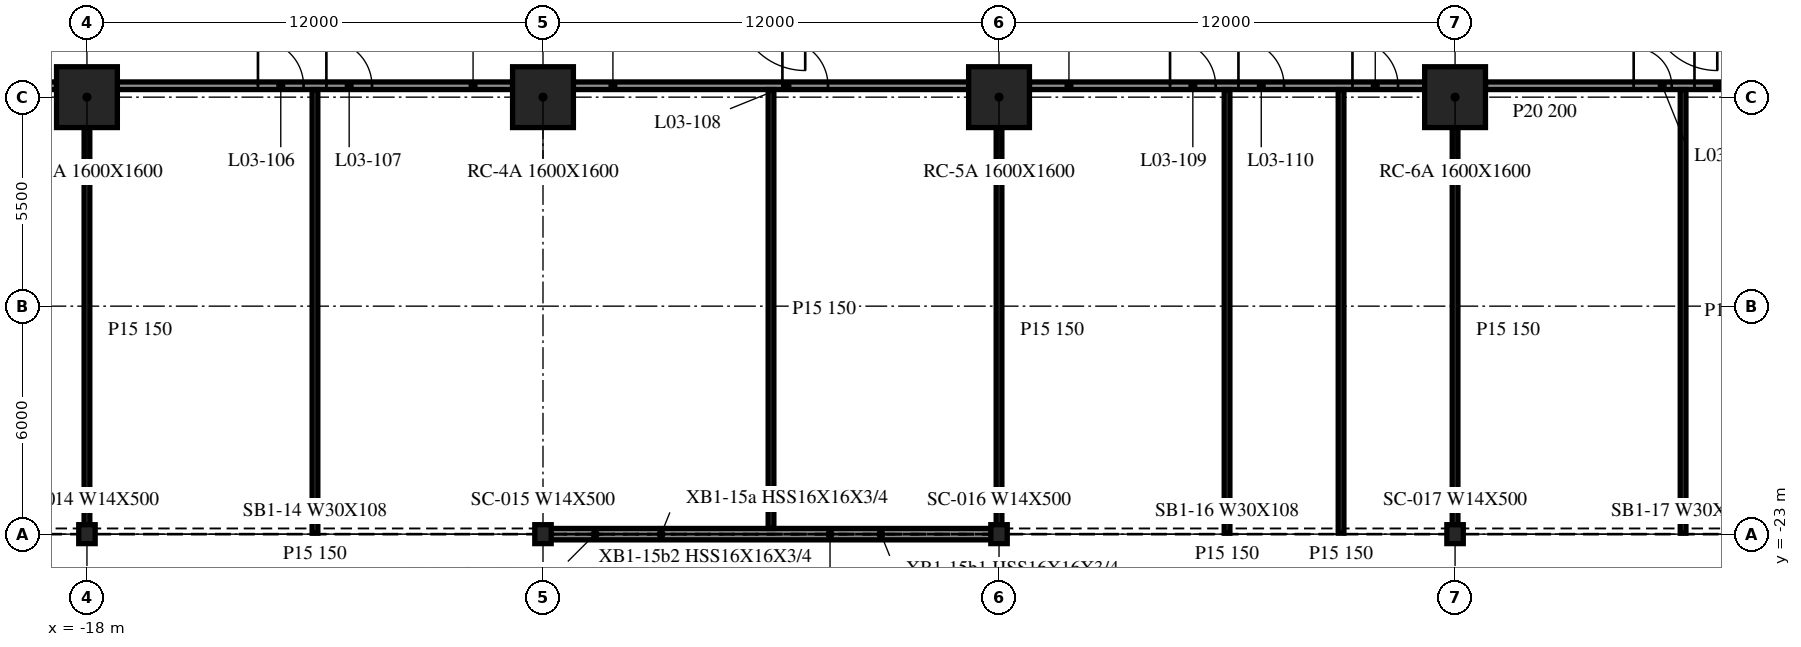
"""IFC4 building model, lengths in metres.
Left out: names, types, materials, properties, quantities, classifications, styles, units other than length and angle.
Written with IfcOpenShell. Run it as: python <this file> out.ifc"""

import sys

from ifc_helpers import new_model, si_unit, direction, frame, frame_2d, origin, origin_2d, place, context, subcontext, project, spatial, rectangle, i_section, extrude, element, fill, save


model = new_model("IFC4")
c1 = context("Model", 3, precision=1e-05, world=origin(), true_north=direction((0.0, 1.0)))
c2 = subcontext(c1, "Body", "Model", "MODEL_VIEW")
j1 = project(units=[si_unit("LENGTHUNIT", "METRE"), si_unit("PLANEANGLEUNIT", "RADIAN")], contexts=[c1])
p1 = place(None, origin())
s1 = spatial("IfcSite", under=j1, at=p1, CompositionType="ELEMENT")
p2 = place(p1, origin())
s2 = spatial("IfcBuilding", under=s1, at=p2, CompositionType="ELEMENT")
p3 = place(p2, frame((0.0, 0.0, 15.8)))
s3 = spatial("IfcBuildingStorey", under=s2, at=p3, CompositionType="ELEMENT", Elevation=15.8)
for number, where, z_axis, x_axis in (
    (1, (-18.0, -11.5, -0.34), (0.0, 0.0, 1.0), (1.0, 0.0, 0.0)),
    (2, (-6.0, -11.5, -0.34), (0.0, 0.0, 1.0), (1.0, 0.0, 0.0)),
    (3, (6.0, -11.5, -0.34), (0.0, 0.0, 1.0), (1.0, 0.0, 0.0)),
    (4, (18.0, -11.5, -0.34), (0.0, 0.0, 1.0), (1.0, 0.0, 0.0)),
):
    element("IfcColumn", number, at=place(p3, frame(where, z_axis=z_axis, x_axis=x_axis)), inside=s3, PredefinedType="COLUMN", context=c2, shape_type="SweptSolid", body=[
        extrude(rectangle(XDim=1.6, YDim=1.6, at=origin_2d()), origin(), (0.0, 0.0, 1.0), 4.3),
    ])
for number, where, z_axis, x_axis in (
    (5, (-18.0, -23.0, -0.34), (0.0, 0.0, 1.0), (1.0, 0.0, 0.0)),
    (6, (-6.0, -23.0, -0.34), (0.0, 0.0, 1.0), (1.0, 0.0, 0.0)),
    (7, (6.0, -23.0, -0.34), (0.0, 0.0, 1.0), (1.0, 0.0, 0.0)),
    (8, (18.0, -23.0, -0.34), (0.0, 0.0, 1.0), (1.0, 0.0, 0.0)),
):
    element("IfcColumn", number, at=place(p3, frame(where, z_axis=z_axis, x_axis=x_axis)), inside=s3, PredefinedType="COLUMN", context=c2, shape_type="SweptSolid", body=[
        extrude(i_section(OverallWidth=0.432, OverallDepth=0.498, WebThickness=0.056, FlangeThickness=0.089, at=origin_2d()), origin(), (0.0, 0.0, 1.0), 4.3),
    ])
p4 = place(p3, frame((-5.972, -23.0, 0.0), z_axis=(0.0, 0.0, 1.0), x_axis=(1.0, 0.0, 0.0)))
e9 = element("IfcWall", 9, at=p4, inside=s3, PredefinedType="NOTDEFINED", context=c2, shape_type="SweptSolid", body=[
    extrude(rectangle(XDim=11.944, YDim=0.3, at=frame_2d((5.972, 0.0))), origin(), (0.0, 0.0, 1.0), 3.203),
])
p5 = place(p3, frame((-29.2, -11.2, 0.0), z_axis=(0.0, 0.0, 1.0), x_axis=(1.0, 0.0, 0.0)))
e10 = element("IfcWall", 10, at=p5, inside=s3, PredefinedType="PARTITIONING", context=c2, shape_type="SweptSolid", body=[
    extrude(rectangle(XDim=10.4, YDim=0.2, at=frame_2d((5.2, 0.0))), origin(), (0.0, 0.0, 1.0), 3.96),
])
p6 = place(p5, frame((3.7, 0.0, 0.0)))
e11 = element("IfcOpeningElement", 11, at=p6, cuts=e10, PredefinedType="OPENING", context=c2, shape_type="SweptSolid", body=[
    extrude(rectangle(XDim=1.2, YDim=2.1, at=frame_2d((0.6, 1.05))), frame((0.0, 0.11, 0.0), z_axis=(0.0, -1.0, 0.0), x_axis=(1.0, 0.0, 0.0)), (0.0, 0.0, 1.0), 0.22),
])
p7 = place(p5, frame((5.5, 0.0, 0.0)))
e12 = element("IfcOpeningElement", 12, at=p7, cuts=e10, PredefinedType="OPENING", context=c2, shape_type="SweptSolid", body=[
    extrude(rectangle(XDim=1.2, YDim=2.1, at=frame_2d((0.6, 1.05))), frame((0.0, 0.11, 0.0), z_axis=(0.0, -1.0, 0.0), x_axis=(1.0, 0.0, 0.0)), (0.0, 0.0, 1.0), 0.22),
])
p8 = place(p5, frame((8.5, 0.0, 0.0)))
e13 = element("IfcOpeningElement", 13, at=p8, cuts=e10, PredefinedType="OPENING", context=c2, shape_type="SweptSolid", body=[
    extrude(rectangle(XDim=1.0, YDim=2.1, at=frame_2d((0.5, 1.05))), frame((0.0, 0.11, 0.0), z_axis=(0.0, -1.0, 0.0), x_axis=(1.0, 0.0, 0.0)), (0.0, 0.0, 1.0), 0.22),
])
p9 = place(p3, frame((-17.2, -11.2, 0.0), z_axis=(0.0, 0.0, 1.0), x_axis=(1.0, 0.0, 0.0)))
e14 = element("IfcWall", 14, at=p9, inside=s3, PredefinedType="PARTITIONING", context=c2, shape_type="SweptSolid", body=[
    extrude(rectangle(XDim=10.4, YDim=0.2, at=frame_2d((5.2, 0.0))), origin(), (0.0, 0.0, 1.0), 3.96),
])
p10 = place(p9, frame((3.7, 0.0, 0.0)))
e15 = element("IfcOpeningElement", 15, at=p10, cuts=e14, PredefinedType="OPENING", context=c2, shape_type="SweptSolid", body=[
    extrude(rectangle(XDim=1.2, YDim=2.1, at=frame_2d((0.6, 1.05))), frame((0.0, 0.11, 0.0), z_axis=(0.0, -1.0, 0.0), x_axis=(1.0, 0.0, 0.0)), (0.0, 0.0, 1.0), 0.22),
])
p11 = place(p9, frame((5.5, 0.0, 0.0)))
e16 = element("IfcOpeningElement", 16, at=p11, cuts=e14, PredefinedType="OPENING", context=c2, shape_type="SweptSolid", body=[
    extrude(rectangle(XDim=1.2, YDim=2.1, at=frame_2d((0.6, 1.05))), frame((0.0, 0.11, 0.0), z_axis=(0.0, -1.0, 0.0), x_axis=(1.0, 0.0, 0.0)), (0.0, 0.0, 1.0), 0.22),
])
p12 = place(p3, frame((-5.2, -11.2, 0.0), z_axis=(0.0, 0.0, 1.0), x_axis=(1.0, 0.0, 0.0)))
e17 = element("IfcWall", 17, at=p12, inside=s3, PredefinedType="PARTITIONING", context=c2, shape_type="SweptSolid", body=[
    extrude(rectangle(XDim=10.4, YDim=0.2, at=frame_2d((5.2, 0.0))), origin(), (0.0, 0.0, 1.0), 3.96),
])
p13 = place(p12, frame((5.5, 0.0, 0.0)))
e18 = element("IfcOpeningElement", 18, at=p13, cuts=e17, PredefinedType="OPENING", context=c2, shape_type="SweptSolid", body=[
    extrude(rectangle(XDim=1.2, YDim=2.1, at=frame_2d((0.6, 1.05))), frame((0.0, 0.11, 0.0), z_axis=(0.0, -1.0, 0.0), x_axis=(1.0, 0.0, 0.0)), (0.0, 0.0, 1.0), 0.22),
])
p14 = place(p3, frame((6.8, -11.2, 0.0), z_axis=(0.0, 0.0, 1.0), x_axis=(1.0, 0.0, 0.0)))
e19 = element("IfcWall", 19, at=p14, inside=s3, PredefinedType="PARTITIONING", context=c2, shape_type="SweptSolid", body=[
    extrude(rectangle(XDim=10.4, YDim=0.2, at=frame_2d((5.2, 0.0))), origin(), (0.0, 0.0, 1.0), 3.96),
])
p15 = place(p14, frame((3.7, 0.0, 0.0)))
e20 = element("IfcOpeningElement", 20, at=p15, cuts=e19, PredefinedType="OPENING", context=c2, shape_type="SweptSolid", body=[
    extrude(rectangle(XDim=1.2, YDim=2.1, at=frame_2d((0.6, 1.05))), frame((0.0, 0.11, 0.0), z_axis=(0.0, -1.0, 0.0), x_axis=(1.0, 0.0, 0.0)), (0.0, 0.0, 1.0), 0.22),
])
p16 = place(p14, frame((5.5, 0.0, 0.0)))
e21 = element("IfcOpeningElement", 21, at=p16, cuts=e19, PredefinedType="OPENING", context=c2, shape_type="SweptSolid", body=[
    extrude(rectangle(XDim=1.2, YDim=2.1, at=frame_2d((0.6, 1.05))), frame((0.0, 0.11, 0.0), z_axis=(0.0, -1.0, 0.0), x_axis=(1.0, 0.0, 0.0)), (0.0, 0.0, 1.0), 0.22),
])
p17 = place(p14, frame((8.5, 0.0, 0.0)))
e22 = element("IfcOpeningElement", 22, at=p17, cuts=e19, PredefinedType="OPENING", context=c2, shape_type="SweptSolid", body=[
    extrude(rectangle(XDim=1.2, YDim=2.1, at=frame_2d((0.6, 1.05))), frame((0.0, 0.11, 0.0), z_axis=(0.0, -1.0, 0.0), x_axis=(1.0, 0.0, 0.0)), (0.0, 0.0, 1.0), 0.22),
])
p18 = place(p3, frame((18.8, -11.2, 0.0), z_axis=(0.0, 0.0, 1.0), x_axis=(1.0, 0.0, 0.0)))
e23 = element("IfcWall", 23, at=p18, inside=s3, PredefinedType="PARTITIONING", context=c2, shape_type="SweptSolid", body=[
    extrude(rectangle(XDim=10.4, YDim=0.2, at=frame_2d((5.2, 0.0))), origin(), (0.0, 0.0, 1.0), 3.96),
])
p19 = place(p18, frame((3.9, 0.0, 0.0)))
e24 = element("IfcOpeningElement", 24, at=p19, cuts=e23, PredefinedType="OPENING", context=c2, shape_type="SweptSolid", body=[
    extrude(rectangle(XDim=1.0, YDim=2.1, at=frame_2d((0.5, 1.05))), frame((0.0, 0.11, 0.0), z_axis=(0.0, -1.0, 0.0), x_axis=(1.0, 0.0, 0.0)), (0.0, 0.0, 1.0), 0.22),
])
p20 = place(p18, frame((5.5, 0.0, 0.0)))
e25 = element("IfcOpeningElement", 25, at=p20, cuts=e23, PredefinedType="OPENING", context=c2, shape_type="SweptSolid", body=[
    extrude(rectangle(XDim=1.2, YDim=2.1, at=frame_2d((0.6, 1.05))), frame((0.0, 0.11, 0.0), z_axis=(0.0, -1.0, 0.0), x_axis=(1.0, 0.0, 0.0)), (0.0, 0.0, 1.0), 0.22),
])
p21 = place(p3, frame((-18.0, -22.975, 0.0), z_axis=(0.0, 0.0, 1.0), x_axis=(0.0, 1.0, 0.0)))
e26 = element("IfcWall", 26, at=p21, inside=s3, PredefinedType="PARTITIONING", context=c2, shape_type="SweptSolid", body=[
    extrude(rectangle(XDim=10.675, YDim=0.15, at=frame_2d((5.337, 0.0))), origin(), (0.0, 0.0, 1.0), 3.96),
])
p22 = place(p3, frame((-12.0, -22.975, 0.0), z_axis=(0.0, 0.0, 1.0), x_axis=(0.0, 1.0, 0.0)))
e27 = element("IfcWall", 27, at=p22, inside=s3, PredefinedType="PARTITIONING", context=c2, shape_type="SweptSolid", body=[
    extrude(rectangle(XDim=11.675, YDim=0.15, at=frame_2d((5.837, 0.0))), origin(), (0.0, 0.0, 1.0), 3.96),
])
p23 = place(p3, frame((0.0, -22.85, 0.0), z_axis=(0.0, 0.0, 1.0), x_axis=(0.0, 1.0, 0.0)))
e28 = element("IfcWall", 28, at=p23, inside=s3, PredefinedType="PARTITIONING", context=c2, shape_type="SweptSolid", body=[
    extrude(rectangle(XDim=11.55, YDim=0.15, at=frame_2d((5.775, 0.0))), origin(), (0.0, 0.0, 1.0), 3.96),
])
p24 = place(p3, frame((6.0, -22.975, 0.0), z_axis=(0.0, 0.0, 1.0), x_axis=(0.0, 1.0, 0.0)))
e29 = element("IfcWall", 29, at=p24, inside=s3, PredefinedType="PARTITIONING", context=c2, shape_type="SweptSolid", body=[
    extrude(rectangle(XDim=10.675, YDim=0.15, at=frame_2d((5.337, 0.0))), origin(), (0.0, 0.0, 1.0), 3.96),
])
for number, where, z_axis, x_axis in (
    (30, (12.0, -22.975, 0.0), (0.0, 0.0, 1.0), (0.0, 1.0, 0.0)),
    (31, (15.0, -22.975, 0.0), (0.0, 0.0, 1.0), (0.0, 1.0, 0.0)),
):
    element("IfcWall", number, at=place(p3, frame(where, z_axis=z_axis, x_axis=x_axis)), inside=s3, PredefinedType="PARTITIONING", context=c2, shape_type="SweptSolid", body=[
        extrude(rectangle(XDim=11.675, YDim=0.15, at=frame_2d((5.837, 0.0))), origin(), (0.0, 0.0, 1.0), 3.96),
    ])
p25 = place(p3, frame((18.0, -22.975, 0.0), z_axis=(0.0, 0.0, 1.0), x_axis=(0.0, 1.0, 0.0)))
e32 = element("IfcWall", 32, at=p25, inside=s3, PredefinedType="PARTITIONING", context=c2, shape_type="SweptSolid", body=[
    extrude(rectangle(XDim=10.675, YDim=0.15, at=frame_2d((5.337, 0.0))), origin(), (0.0, 0.0, 1.0), 3.96),
])
p26 = place(p3, frame((24.0, -22.975, 0.0), z_axis=(0.0, 0.0, 1.0), x_axis=(0.0, 1.0, 0.0)))
e33 = element("IfcWall", 33, at=p26, inside=s3, PredefinedType="PARTITIONING", context=c2, shape_type="SweptSolid", body=[
    extrude(rectangle(XDim=11.675, YDim=0.15, at=frame_2d((5.837, 0.0))), origin(), (0.0, 0.0, 1.0), 3.96),
])
p27 = place(p10, origin())
e34 = element("IfcDoor", 34, at=p27, inside=s3, OperationType="SINGLE_SWING_RIGHT", PredefinedType="DOOR", context=c2, shape_type="SweptSolid", body=[
    extrude(rectangle(XDim=1.2, YDim=2.1, at=frame_2d((0.6, 1.05))), frame((0.0, 0.025, 0.0), z_axis=(0.0, -1.0, 0.0), x_axis=(1.0, 0.0, 0.0)), (0.0, 0.0, 1.0), 0.05),
])
fill(e15, e34)
p28 = place(p11, origin())
e35 = element("IfcDoor", 35, at=p28, inside=s3, OperationType="SINGLE_SWING_LEFT", PredefinedType="DOOR", context=c2, shape_type="SweptSolid", body=[
    extrude(rectangle(XDim=1.2, YDim=2.1, at=frame_2d((0.6, 1.05))), frame((0.0, 0.025, 0.0), z_axis=(0.0, -1.0, 0.0), x_axis=(1.0, 0.0, 0.0)), (0.0, 0.0, 1.0), 0.05),
])
fill(e16, e35)
p29 = place(p13, origin())
e36 = element("IfcDoor", 36, at=p29, inside=s3, OperationType="SINGLE_SWING_LEFT", PredefinedType="DOOR", context=c2, shape_type="SweptSolid", body=[
    extrude(rectangle(XDim=1.2, YDim=2.1, at=frame_2d((0.6, 1.05))), frame((0.0, 0.025, 0.0), z_axis=(0.0, -1.0, 0.0), x_axis=(1.0, 0.0, 0.0)), (0.0, 0.0, 1.0), 0.05),
])
fill(e18, e36)
p30 = place(p15, origin())
e37 = element("IfcDoor", 37, at=p30, inside=s3, OperationType="SINGLE_SWING_RIGHT", PredefinedType="DOOR", context=c2, shape_type="SweptSolid", body=[
    extrude(rectangle(XDim=1.2, YDim=2.1, at=frame_2d((0.6, 1.05))), frame((0.0, 0.025, 0.0), z_axis=(0.0, -1.0, 0.0), x_axis=(1.0, 0.0, 0.0)), (0.0, 0.0, 1.0), 0.05),
])
fill(e20, e37)
p31 = place(p16, origin())
e38 = element("IfcDoor", 38, at=p31, inside=s3, OperationType="SINGLE_SWING_LEFT", PredefinedType="DOOR", context=c2, shape_type="SweptSolid", body=[
    extrude(rectangle(XDim=1.2, YDim=2.1, at=frame_2d((0.6, 1.05))), frame((0.0, 0.025, 0.0), z_axis=(0.0, -1.0, 0.0), x_axis=(1.0, 0.0, 0.0)), (0.0, 0.0, 1.0), 0.05),
])
fill(e21, e38)
p32 = place(p17, origin())
e39 = element("IfcDoor", 39, at=p32, inside=s3, OperationType="SINGLE_SWING_LEFT", PredefinedType="DOOR", context=c2, shape_type="SweptSolid", body=[
    extrude(rectangle(XDim=1.2, YDim=2.1, at=frame_2d((0.6, 1.05))), frame((0.0, 0.025, 0.0), z_axis=(0.0, -1.0, 0.0), x_axis=(1.0, 0.0, 0.0)), (0.0, 0.0, 1.0), 0.05),
])
fill(e22, e39)
p33 = place(p19, origin())
e40 = element("IfcDoor", 40, at=p33, inside=s3, OperationType="SINGLE_SWING_RIGHT", PredefinedType="DOOR", context=c2, shape_type="SweptSolid", body=[
    extrude(rectangle(XDim=1.0, YDim=2.1, at=frame_2d((0.5, 1.05))), frame((0.0, 0.025, 0.0), z_axis=(0.0, -1.0, 0.0), x_axis=(1.0, 0.0, 0.0)), (0.0, 0.0, 1.0), 0.05),
])
fill(e24, e40)
p34 = place(p20, origin())
e41 = element("IfcDoor", 41, at=p34, inside=s3, OperationType="SINGLE_SWING_LEFT", PredefinedType="DOOR", context=c2, shape_type="SweptSolid", body=[
    extrude(rectangle(XDim=1.2, YDim=2.1, at=frame_2d((0.6, 1.05))), frame((0.0, 0.025, 0.0), z_axis=(0.0, -1.0, 0.0), x_axis=(1.0, 0.0, 0.0)), (0.0, 0.0, 1.0), 0.05),
])
fill(e25, e41)
save(model, sys.argv[1])
